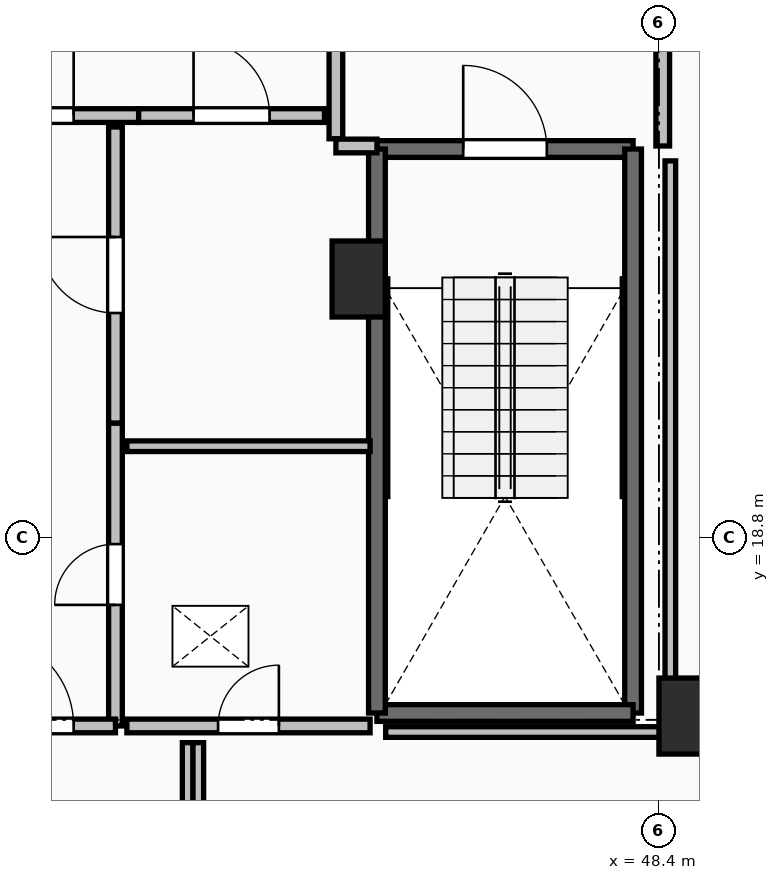
"""IFC4 building model, lengths in metres.
Left out: names, types, materials, properties, quantities, classifications, styles, units other than length and angle.
Written with IfcOpenShell. Run it as: python <this file> out.ifc"""

import sys

from ifc_helpers import new_model, si_unit, direction, frame, frame_2d, origin, origin_2d, place, context, subcontext, project, spatial, rectangle, extrude, element, fill, save


model = new_model("IFC4")
c1 = context("Model", 3, precision=1e-05, world=origin(), true_north=direction((0.0, 1.0)))
c2 = subcontext(c1, "Body", "Model", "MODEL_VIEW")
j1 = project(units=[si_unit("LENGTHUNIT", "METRE"), si_unit("PLANEANGLEUNIT", "RADIAN")], contexts=[c1])
p1 = place(None, origin())
s1 = spatial("IfcSite", under=j1, at=p1, CompositionType="ELEMENT")
p2 = place(p1, origin())
s2 = spatial("IfcBuilding", under=s1, at=p2, CompositionType="ELEMENT")
p3 = place(p2, frame((0.0, 0.0, 244.9)))
s3 = spatial("IfcBuildingStorey", under=s2, at=p3, CompositionType="ELEMENT", Elevation=244.9)
for number, where, z_axis, x_axis in (
    (1, (48.75, 16.45, 0.0), (0.0, 0.0, 1.0), (1.0, 0.0, 0.0)),
    (2, (44.45, 22.2, 0.0), (0.0, 0.0, 1.0), (1.0, 0.0, 0.0)),
):
    element("IfcColumn", number, at=place(p3, frame(where, z_axis=z_axis, x_axis=x_axis)), inside=s3, PredefinedType="PILASTER", context=c2, shape_type="SweptSolid", body=[
        extrude(rectangle(XDim=0.7, YDim=1.0, at=origin_2d()), origin(), (0.0, 0.0, 1.0), 3.55),
    ])
p4 = place(p3, frame((44.69, 23.91, 0.0), z_axis=(0.0, 0.0, 1.0), x_axis=(1.0, 0.0, 0.0)))
e3 = element("IfcWall", 3, at=p4, inside=s3, PredefinedType="SOLIDWALL", context=c2, shape_type="SweptSolid", body=[
    extrude(rectangle(XDim=3.37, YDim=0.22, at=frame_2d((1.685, 0.0))), origin(), (0.0, 0.0, 1.0), 3.29),
])
p5 = place(p4, frame((1.135, 0.0, 0.0)))
e4 = element("IfcOpeningElement", 4, at=p5, cuts=e3, PredefinedType="OPENING", context=c2, shape_type="SweptSolid", body=[
    extrude(rectangle(XDim=1.1, YDim=2.15, at=frame_2d((0.55, 1.075))), frame((0.0, 0.125, 0.0), z_axis=(0.0, -1.0, 0.0), x_axis=(1.0, 0.0, 0.0)), (0.0, 0.0, 1.0), 0.25),
])
p6 = place(p3, frame((48.06, 23.91, 0.0), z_axis=(0.0, 0.0, 1.0), x_axis=(0.0, -1.0, 0.0)))
e5 = element("IfcWall", 5, at=p6, inside=s3, PredefinedType="SOLIDWALL", context=c2, shape_type="SweptSolid", body=[
    extrude(rectangle(XDim=7.42, YDim=0.22, at=frame_2d((3.71, 0.0))), origin(), (0.0, 0.0, 1.0), 3.29),
])
p7 = place(p3, frame((48.06, 16.49, 0.0), z_axis=(0.0, 0.0, 1.0), x_axis=(-1.0, 0.0, 0.0)))
e6 = element("IfcWall", 6, at=p7, inside=s3, PredefinedType="SOLIDWALL", context=c2, shape_type="SweptSolid", body=[
    extrude(rectangle(XDim=3.37, YDim=0.22, at=frame_2d((1.685, 0.0))), origin(), (0.0, 0.0, 1.0), 3.29),
])
p8 = place(p3, frame((44.69, 16.49, 0.0), z_axis=(0.0, 0.0, 1.0), x_axis=(0.0, 1.0, 0.0)))
e7 = element("IfcWall", 7, at=p8, inside=s3, PredefinedType="SOLIDWALL", context=c2, shape_type="SweptSolid", body=[
    extrude(rectangle(XDim=7.42, YDim=0.22, at=frame_2d((3.71, 0.0))), origin(), (0.0, 0.0, 1.0), 3.29),
])
p9 = place(p3, frame((44.15, 27.955, 0.0), z_axis=(0.0, 0.0, 1.0), x_axis=(0.0, -1.0, 0.0)))
e8 = element("IfcWall", 8, at=p9, inside=s3, PredefinedType="PARTITIONING", context=c2, shape_type="SweptSolid", body=[
    extrude(rectangle(XDim=3.91, YDim=0.18, at=frame_2d((1.955, 0.0))), origin(), (0.0, 0.0, 1.0), 3.29),
])
p10 = place(p9, frame((1.355, 0.0, 0.0)))
e9 = element("IfcOpeningElement", 9, at=p10, cuts=e8, PredefinedType="OPENING", context=c2, shape_type="SweptSolid", body=[
    extrude(rectangle(XDim=1.2, YDim=2.15, at=frame_2d((0.6, 1.075))), frame((0.0, 0.105, 0.0), z_axis=(0.0, -1.0, 0.0), x_axis=(1.0, 0.0, 0.0)), (0.0, 0.0, 1.0), 0.21),
])
p11 = place(p3, frame((44.15, 23.95, 0.0), z_axis=(0.0, 0.0, 1.0), x_axis=(1.0, 0.0, 0.0)))
e10 = element("IfcWall", 10, at=p11, inside=s3, PredefinedType="PARTITIONING", context=c2, shape_type="SweptSolid", body=[
    extrude(rectangle(XDim=0.54, YDim=0.18, at=frame_2d((0.27, 0.0))), origin(), (0.0, 0.0, 1.0), 3.29),
])
p12 = place(p3, frame((48.45, 23.95, 0.0), z_axis=(0.0, 0.0, 1.0), x_axis=(0.0, 1.0, 0.0)))
e11 = element("IfcWall", 11, at=p12, inside=s3, PredefinedType="PARTITIONING", context=c2, shape_type="SweptSolid", body=[
    extrude(rectangle(XDim=4.05, YDim=0.18, at=frame_2d((2.025, 0.0))), origin(), (0.0, 0.0, 1.0), 3.29),
])
p13 = place(p12, frame((1.425, 0.0, 0.0)))
e12 = element("IfcOpeningElement", 12, at=p13, cuts=e11, PredefinedType="OPENING", context=c2, shape_type="SweptSolid", body=[
    extrude(rectangle(XDim=1.2, YDim=2.15, at=frame_2d((0.6, 1.075))), frame((0.0, 0.105, 0.0), z_axis=(0.0, -1.0, 0.0), x_axis=(1.0, 0.0, 0.0)), (0.0, 0.0, 1.0), 0.21),
])
p14 = place(p3, frame((38.645, 24.35, 0.0), z_axis=(0.0, 0.0, 1.0), x_axis=(1.0, 0.0, 0.0)))
e13 = element("IfcWall", 13, at=p14, inside=s3, PredefinedType="PARTITIONING", context=c2, shape_type="SweptSolid", body=[
    extrude(rectangle(XDim=2.91, YDim=0.18, at=frame_2d((1.455, 0.0))), origin(), (0.0, 0.0, 1.0), 3.29),
])
p15 = place(p14, frame((0.855, 0.0, 0.0)))
e14 = element("IfcOpeningElement", 14, at=p15, cuts=e13, PredefinedType="OPENING", context=c2, shape_type="SweptSolid", body=[
    extrude(rectangle(XDim=1.2, YDim=2.15, at=frame_2d((0.6, 1.075))), frame((0.0, 0.105, 0.0), z_axis=(0.0, -1.0, 0.0), x_axis=(1.0, 0.0, 0.0)), (0.0, 0.0, 1.0), 0.21),
])
p16 = place(p3, frame((41.555, 24.35, 0.0), z_axis=(0.0, 0.0, 1.0), x_axis=(1.0, 0.0, 0.0)))
e15 = element("IfcWall", 15, at=p16, inside=s3, PredefinedType="PARTITIONING", context=c2, shape_type="SweptSolid", body=[
    extrude(rectangle(XDim=2.445, YDim=0.18, at=frame_2d((1.223, 0.0))), origin(), (0.0, 0.0, 1.0), 3.29),
])
p17 = place(p16, frame((0.722, 0.0, 0.0)))
e16 = element("IfcOpeningElement", 16, at=p17, cuts=e15, PredefinedType="OPENING", context=c2, shape_type="SweptSolid", body=[
    extrude(rectangle(XDim=1.0, YDim=2.15, at=frame_2d((0.5, 1.075))), frame((0.0, 0.105, 0.0), z_axis=(0.0, -1.0, 0.0), x_axis=(1.0, 0.0, 0.0)), (0.0, 0.0, 1.0), 0.21),
])
p18 = place(p3, frame((41.25, 16.32, 0.0), z_axis=(0.0, 0.0, 1.0), x_axis=(0.0, 1.0, 0.0)))
e17 = element("IfcWall", 17, at=p18, inside=s3, PredefinedType="PARTITIONING", context=c2, shape_type="SweptSolid", body=[
    extrude(rectangle(XDim=3.985, YDim=0.18, at=frame_2d((1.992, 0.0))), origin(), (0.0, 0.0, 1.0), 3.29),
])
p19 = place(p18, frame((1.593, 0.0, 0.0)))
e18 = element("IfcOpeningElement", 18, at=p19, cuts=e17, PredefinedType="OPENING", context=c2, shape_type="SweptSolid", body=[
    extrude(rectangle(XDim=0.8, YDim=2.05, at=frame_2d((0.4, 1.025))), frame((0.0, 0.105, 0.0), z_axis=(0.0, -1.0, 0.0), x_axis=(1.0, 0.0, 0.0)), (0.0, 0.0, 1.0), 0.21),
])
p20 = place(p3, frame((41.25, 20.305, 0.0), z_axis=(0.0, 0.0, 1.0), x_axis=(0.0, 1.0, 0.0)))
e19 = element("IfcWall", 19, at=p20, inside=s3, PredefinedType="PARTITIONING", context=c2, shape_type="SweptSolid", body=[
    extrude(rectangle(XDim=3.895, YDim=0.18, at=frame_2d((1.948, 0.0))), origin(), (0.0, 0.0, 1.0), 2.482),
])
p21 = place(p20, frame((1.448, 0.0, 0.0)))
e20 = element("IfcOpeningElement", 20, at=p21, cuts=e19, PredefinedType="OPENING", context=c2, shape_type="SweptSolid", body=[
    extrude(rectangle(XDim=1.0, YDim=2.15, at=frame_2d((0.5, 1.075))), frame((0.0, 0.105, 0.0), z_axis=(0.0, -1.0, 0.0), x_axis=(1.0, 0.0, 0.0)), (0.0, 0.0, 1.0), 0.21),
])
p22 = place(p3, frame((38.95, 16.32, 0.0), z_axis=(0.0, 0.0, 1.0), x_axis=(1.0, 0.0, 0.0)))
e21 = element("IfcWall", 21, at=p22, inside=s3, PredefinedType="PARTITIONING", context=c2, shape_type="SweptSolid", body=[
    extrude(rectangle(XDim=2.3, YDim=0.18, at=frame_2d((1.15, 0.0))), origin(), (0.0, 0.0, 1.0), 3.29),
])
p23 = place(p22, frame((0.55, 0.0, 0.0)))
e22 = element("IfcOpeningElement", 22, at=p23, cuts=e21, PredefinedType="OPENING", context=c2, shape_type="SweptSolid", body=[
    extrude(rectangle(XDim=1.2, YDim=2.15, at=frame_2d((0.6, 1.075))), frame((0.0, 0.105, 0.0), z_axis=(0.0, -1.0, 0.0), x_axis=(1.0, 0.0, 0.0)), (0.0, 0.0, 1.0), 0.21),
])
p24 = place(p3, frame((44.6, 20.0, 0.0), z_axis=(0.0, 0.0, 1.0), x_axis=(-1.0, 0.0, 0.0)))
e23 = element("IfcWall", 23, at=p24, inside=s3, PredefinedType="PARTITIONING", context=c2, shape_type="SweptSolid", body=[
    extrude(rectangle(XDim=3.2, YDim=0.14, at=frame_2d((1.6, 0.0))), origin(), (0.0, 0.0, 1.0), 3.29),
])
p25 = place(p3, frame((41.4, 16.32, 0.0), z_axis=(0.0, 0.0, 1.0), x_axis=(1.0, 0.0, 0.0)))
e24 = element("IfcWall", 24, at=p25, inside=s3, PredefinedType="PARTITIONING", context=c2, shape_type="SweptSolid", body=[
    extrude(rectangle(XDim=3.2, YDim=0.18, at=frame_2d((1.6, 0.0))), origin(), (0.0, 0.0, 1.0), 3.29),
])
p26 = place(p25, frame((1.2, 0.0, 0.0)))
e25 = element("IfcOpeningElement", 25, at=p26, cuts=e24, PredefinedType="OPENING", context=c2, shape_type="SweptSolid", body=[
    extrude(rectangle(XDim=0.8, YDim=2.05, at=frame_2d((0.4, 1.025))), frame((0.0, 0.105, 0.0), z_axis=(0.0, -1.0, 0.0), x_axis=(1.0, 0.0, 0.0)), (0.0, 0.0, 1.0), 0.21),
])
p27 = place(p3, frame((44.805, 16.24, 0.0), z_axis=(0.0, 0.0, 1.0), x_axis=(1.0, 0.0, 0.0)))
e26 = element("IfcWall", 26, at=p27, inside=s3, PredefinedType="PARTITIONING", context=c2, shape_type="SweptSolid", body=[
    extrude(rectangle(XDim=3.745, YDim=0.14, at=frame_2d((1.873, 0.0))), origin(), (0.0, 0.0, 1.0), 2.482),
])
p28 = place(p3, frame((48.55, 16.24, 0.0), z_axis=(0.0, 0.0, 1.0), x_axis=(0.0, 1.0, 0.0)))
e27 = element("IfcWall", 27, at=p28, inside=s3, PredefinedType="PARTITIONING", context=c2, shape_type="SweptSolid", body=[
    extrude(rectangle(XDim=7.514, YDim=0.14, at=frame_2d((3.757, 0.0))), origin(), (0.0, 0.0, 1.0), 2.482),
])
for number, where, z_axis, x_axis in (
    (28, (42.2, 16.1, 0.0), (0.0, 0.0, 1.0), (0.0, -1.0, 0.0)),
    (29, (42.34, 14.27, 0.0), (0.0, 0.0, 1.0), (0.0, 1.0, 0.0)),
):
    element("IfcWall", number, at=place(p3, frame(where, z_axis=z_axis, x_axis=x_axis)), inside=s3, PredefinedType="PARTITIONING", context=c2, shape_type="SweptSolid", body=[
        extrude(rectangle(XDim=1.83, YDim=0.14, at=frame_2d((0.915, 0.0))), origin(), (0.0, 0.0, 1.0), 3.022),
    ])
p29 = place(p5, origin())
e30 = element("IfcDoor", 30, at=p29, inside=s3, OperationType="SINGLE_SWING_LEFT", PredefinedType="DOOR", context=c2, shape_type="SweptSolid", body=[
    extrude(rectangle(XDim=1.1, YDim=2.15, at=frame_2d((0.55, 1.075))), frame((0.0, 0.025, 0.0), z_axis=(0.0, -1.0, 0.0), x_axis=(1.0, 0.0, 0.0)), (0.0, 0.0, 1.0), 0.05),
])
fill(e4, e30)
p30 = place(p15, origin())
e31 = element("IfcDoor", 31, at=p30, inside=s3, OperationType="SINGLE_SWING_RIGHT", PredefinedType="DOOR", context=c2, shape_type="SweptSolid", body=[
    extrude(rectangle(XDim=1.2, YDim=2.15, at=frame_2d((0.6, 1.075))), frame((0.0, 0.025, 0.0), z_axis=(0.0, -1.0, 0.0), x_axis=(1.0, 0.0, 0.0)), (0.0, 0.0, 1.0), 0.05),
])
fill(e14, e31)
p31 = place(p17, origin())
e32 = element("IfcDoor", 32, at=p31, inside=s3, OperationType="SINGLE_SWING_LEFT", PredefinedType="DOOR", context=c2, shape_type="SweptSolid", body=[
    extrude(rectangle(XDim=1.0, YDim=2.15, at=frame_2d((0.5, 1.075))), frame((0.0, 0.025, 0.0), z_axis=(0.0, -1.0, 0.0), x_axis=(1.0, 0.0, 0.0)), (0.0, 0.0, 1.0), 0.05),
])
fill(e16, e32)
p32 = place(p19, origin())
e33 = element("IfcDoor", 33, at=p32, inside=s3, OperationType="SINGLE_SWING_LEFT", PredefinedType="DOOR", context=c2, shape_type="SweptSolid", body=[
    extrude(rectangle(XDim=0.8, YDim=2.05, at=frame_2d((0.4, 1.025))), frame((0.0, 0.025, 0.0), z_axis=(0.0, -1.0, 0.0), x_axis=(1.0, 0.0, 0.0)), (0.0, 0.0, 1.0), 0.05),
])
fill(e18, e33)
p33 = place(p21, origin())
e34 = element("IfcDoor", 34, at=p33, inside=s3, OperationType="SINGLE_SWING_RIGHT", PredefinedType="DOOR", context=c2, shape_type="SweptSolid", body=[
    extrude(rectangle(XDim=1.0, YDim=2.15, at=frame_2d((0.5, 1.075))), frame((0.0, 0.025, 0.0), z_axis=(0.0, -1.0, 0.0), x_axis=(1.0, 0.0, 0.0)), (0.0, 0.0, 1.0), 0.05),
])
fill(e20, e34)
p34 = place(p23, origin())
e35 = element("IfcDoor", 35, at=p34, inside=s3, OperationType="SINGLE_SWING_LEFT", PredefinedType="DOOR", context=c2, shape_type="SweptSolid", body=[
    extrude(rectangle(XDim=1.2, YDim=2.15, at=frame_2d((0.6, 1.075))), frame((0.0, 0.025, 0.0), z_axis=(0.0, -1.0, 0.0), x_axis=(1.0, 0.0, 0.0)), (0.0, 0.0, 1.0), 0.05),
])
fill(e22, e35)
p35 = place(p26, origin())
e36 = element("IfcDoor", 36, at=p35, inside=s3, OperationType="SINGLE_SWING_RIGHT", PredefinedType="DOOR", context=c2, shape_type="SweptSolid", body=[
    extrude(rectangle(XDim=0.8, YDim=2.05, at=frame_2d((0.4, 1.025))), frame((0.0, 0.025, 0.0), z_axis=(0.0, -1.0, 0.0), x_axis=(1.0, 0.0, 0.0)), (0.0, 0.0, 1.0), 0.05),
])
fill(e25, e36)
save(model, sys.argv[1])
